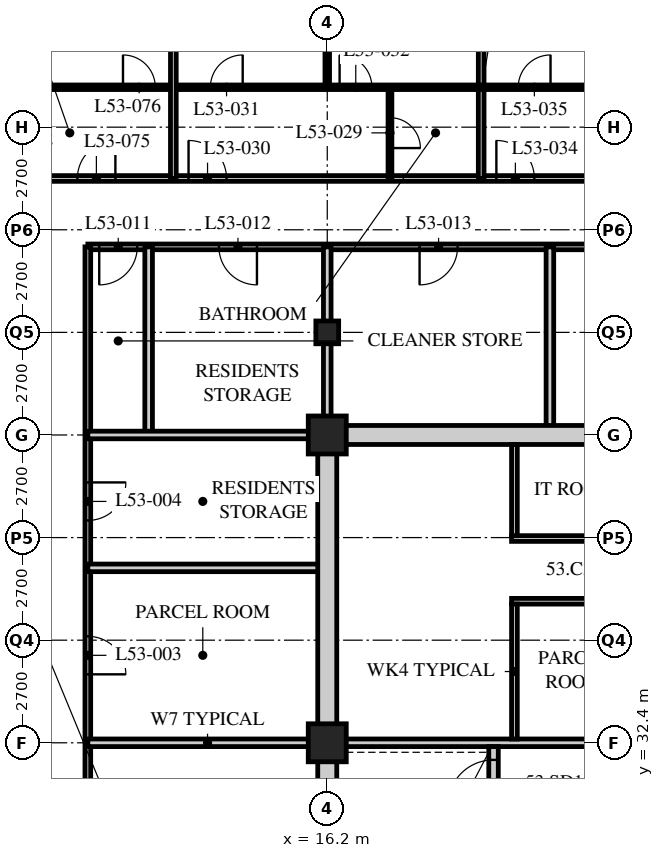
"""IFC4 building model, lengths in metres.
Left out: names, types, materials, properties, quantities, classifications, styles, units other than length and angle.
Written with IfcOpenShell. Run it as: python <this file> out.ifc"""

import sys

from ifc_helpers import new_model, si_unit, direction, frame, frame_2d, origin, origin_2d, place, context, subcontext, project, spatial, rectangle, hollow_rectangle, extrude, element, fill, save


model = new_model("IFC4")
c1 = context("Model", 3, precision=1e-05, world=origin(), true_north=direction((0.0, 1.0)))
c2 = subcontext(c1, "Body", "Model", "MODEL_VIEW")
j1 = project(units=[si_unit("LENGTHUNIT", "METRE"), si_unit("PLANEANGLEUNIT", "RADIAN")], contexts=[c1])
p1 = place(None, origin())
s1 = spatial("IfcSite", under=j1, at=p1, CompositionType="ELEMENT")
p2 = place(p1, origin())
s2 = spatial("IfcBuilding", under=s1, at=p2, CompositionType="ELEMENT")
p3 = place(p2, frame((0.0, 0.0, 206.4)))
s3 = spatial("IfcBuildingStorey", under=s2, at=p3, CompositionType="ELEMENT", Elevation=206.4)
for number, where, z_axis, x_axis in (
    (1, (16.2, 32.4, 0.0), (0.0, 0.0, 1.0), (1.0, 0.0, 0.0)),
    (2, (16.2, 40.5, 0.0), (0.0, 0.0, 1.0), (1.0, 0.0, 0.0)),
):
    element("IfcColumn", number, at=place(p3, frame(where, z_axis=z_axis, x_axis=x_axis)), inside=s3, PredefinedType="COLUMN", context=c2, shape_type="SweptSolid", body=[
        extrude(hollow_rectangle(XDim=1.0, YDim=1.0, WallThickness=0.1, at=origin_2d()), origin(), (0.0, 0.0, 1.0), 3.6),
    ])
p4 = place(p3, frame((16.2, 43.2, 0.0), z_axis=(0.0, 0.0, 1.0), x_axis=(1.0, 0.0, 0.0)))
e3 = element("IfcColumn", 3, at=p4, inside=s3, PredefinedType="COLUMN", context=c2, shape_type="SweptSolid", body=[
    extrude(hollow_rectangle(XDim=0.6, YDim=0.6, WallThickness=0.05, at=origin_2d()), origin(), (0.0, 0.0, 1.0), 3.6),
])
p5 = place(p3, frame((8.1, 47.25, 0.0), z_axis=(0.0, 0.0, 1.0), x_axis=(1.0, 0.0, 0.0)))
e4 = element("IfcWall", 4, at=p5, inside=s3, PredefinedType="PARTITIONING", context=c2, shape_type="SweptSolid", body=[
    extrude(rectangle(XDim=36.45, YDim=0.15, at=frame_2d((18.225, 0.0))), origin(), (0.0, 0.0, 1.0), 3.39),
])
p6 = place(p5, frame((4.45, 0.0, 0.0)))
e5 = element("IfcOpeningElement", 5, at=p6, cuts=e4, PredefinedType="OPENING", context=c2, shape_type="SweptSolid", body=[
    extrude(rectangle(XDim=1.0, YDim=2.1, at=frame_2d((0.5, 1.05))), frame((0.0, 0.085, 0.0), z_axis=(0.0, -1.0, 0.0), x_axis=(1.0, 0.0, 0.0)), (0.0, 0.0, 1.0), 0.17),
])
p7 = place(p5, frame((12.55, 0.0, 0.0)))
e6 = element("IfcOpeningElement", 6, at=p7, cuts=e4, PredefinedType="OPENING", context=c2, shape_type="SweptSolid", body=[
    extrude(rectangle(XDim=1.0, YDim=2.1, at=frame_2d((0.5, 1.05))), frame((0.0, 0.085, 0.0), z_axis=(0.0, -1.0, 0.0), x_axis=(1.0, 0.0, 0.0)), (0.0, 0.0, 1.0), 0.17),
])
p8 = place(p5, frame((30.7, 0.0, 0.0)))
e7 = element("IfcOpeningElement", 7, at=p8, cuts=e4, PredefinedType="OPENING", context=c2, shape_type="SweptSolid", body=[
    extrude(rectangle(XDim=1.0, YDim=2.1, at=frame_2d((0.5, 1.05))), frame((0.0, 0.085, 0.0), z_axis=(0.0, -1.0, 0.0), x_axis=(1.0, 0.0, 0.0)), (0.0, 0.0, 1.0), 0.17),
])
p9 = place(p5, frame((33.925, 0.0, 0.0)))
e8 = element("IfcOpeningElement", 8, at=p9, cuts=e4, PredefinedType="OPENING", context=c2, shape_type="SweptSolid", body=[
    extrude(rectangle(XDim=1.0, YDim=2.1, at=frame_2d((0.5, 1.05))), frame((0.0, 0.085, 0.0), z_axis=(0.0, -1.0, 0.0), x_axis=(1.0, 0.0, 0.0)), (0.0, 0.0, 1.0), 0.17),
])
p10 = place(p5, frame((1.525, 0.0, 0.0)))
e9 = element("IfcOpeningElement", 9, at=p10, cuts=e4, PredefinedType="OPENING", context=c2, shape_type="SweptSolid", body=[
    extrude(rectangle(XDim=1.0, YDim=2.1, at=frame_2d((0.5, 1.05))), frame((0.0, 0.085, 0.0), z_axis=(0.0, -1.0, 0.0), x_axis=(1.0, 0.0, 0.0)), (0.0, 0.0, 1.0), 0.17),
])
p11 = place(p3, frame((27.14, 45.45, 0.0), z_axis=(0.0, 0.0, 1.0), x_axis=(-1.0, 0.0, 0.0)))
e10 = element("IfcWall", 10, at=p11, inside=s3, PredefinedType="PARTITIONING", context=c2, shape_type="SweptSolid", body=[
    extrude(rectangle(XDim=17.24, YDim=0.15, at=frame_2d((8.62, 0.0))), origin(), (0.0, 0.0, 1.0), 3.39),
])
p12 = place(p11, frame((15.94, 0.0, 0.0)))
e11 = element("IfcOpeningElement", 11, at=p12, cuts=e10, PredefinedType="OPENING", context=c2, shape_type="SweptSolid", body=[
    extrude(rectangle(XDim=1.0, YDim=2.1, at=frame_2d((0.5, 1.05))), frame((0.0, 0.085, 0.0), z_axis=(0.0, -1.0, 0.0), x_axis=(1.0, 0.0, 0.0)), (0.0, 0.0, 1.0), 0.17),
])
p13 = place(p11, frame((12.79, 0.0, 0.0)))
e12 = element("IfcOpeningElement", 12, at=p13, cuts=e10, PredefinedType="OPENING", context=c2, shape_type="SweptSolid", body=[
    extrude(rectangle(XDim=1.0, YDim=2.1, at=frame_2d((0.5, 1.05))), frame((0.0, 0.085, 0.0), z_axis=(0.0, -1.0, 0.0), x_axis=(1.0, 0.0, 0.0)), (0.0, 0.0, 1.0), 0.17),
])
p14 = place(p11, frame((7.511, 0.0, 0.0)))
e13 = element("IfcOpeningElement", 13, at=p14, cuts=e10, PredefinedType="OPENING", context=c2, shape_type="SweptSolid", body=[
    extrude(rectangle(XDim=1.0, YDim=2.1, at=frame_2d((0.5, 1.05))), frame((0.0, 0.085, 0.0), z_axis=(0.0, -1.0, 0.0), x_axis=(1.0, 0.0, 0.0)), (0.0, 0.0, 1.0), 0.17),
])
p15 = place(p11, frame((2.036, 0.0, 0.0)))
e14 = element("IfcOpeningElement", 14, at=p15, cuts=e10, PredefinedType="OPENING", context=c2, shape_type="SweptSolid", body=[
    extrude(rectangle(XDim=1.0, YDim=2.1, at=frame_2d((0.5, 1.05))), frame((0.0, 0.085, 0.0), z_axis=(0.0, -1.0, 0.0), x_axis=(1.0, 0.0, 0.0)), (0.0, 0.0, 1.0), 0.17),
])
p16 = place(p3, frame((9.9, 45.45, 0.0), z_axis=(0.0, 0.0, 1.0), x_axis=(0.0, -1.0, 0.0)))
e15 = element("IfcWall", 15, at=p16, inside=s3, PredefinedType="PARTITIONING", context=c2, shape_type="SweptSolid", body=[
    extrude(rectangle(XDim=24.75, YDim=0.15, at=frame_2d((12.375, 0.0))), origin(), (0.0, 0.0, 1.0), 3.39),
])
p17 = place(p16, frame((19.698, 0.0, 0.0)))
e16 = element("IfcOpeningElement", 16, at=p17, cuts=e15, PredefinedType="OPENING", context=c2, shape_type="SweptSolid", body=[
    extrude(rectangle(XDim=1.0, YDim=2.1, at=frame_2d((0.5, 1.05))), frame((0.0, 0.085, 0.0), z_axis=(0.0, -1.0, 0.0), x_axis=(1.0, 0.0, 0.0)), (0.0, 0.0, 1.0), 0.17),
])
p18 = place(p16, frame((15.648, 0.0, 0.0)))
e17 = element("IfcOpeningElement", 17, at=p18, cuts=e15, PredefinedType="OPENING", context=c2, shape_type="SweptSolid", body=[
    extrude(rectangle(XDim=1.0, YDim=2.1, at=frame_2d((0.5, 1.05))), frame((0.0, 0.085, 0.0), z_axis=(0.0, -1.0, 0.0), x_axis=(1.0, 0.0, 0.0)), (0.0, 0.0, 1.0), 0.17),
])
p19 = place(p16, frame((10.248, 0.0, 0.0)))
e18 = element("IfcOpeningElement", 18, at=p19, cuts=e15, PredefinedType="OPENING", context=c2, shape_type="SweptSolid", body=[
    extrude(rectangle(XDim=1.0, YDim=2.1, at=frame_2d((0.5, 1.05))), frame((0.0, 0.085, 0.0), z_axis=(0.0, -1.0, 0.0), x_axis=(1.0, 0.0, 0.0)), (0.0, 0.0, 1.0), 0.17),
])
p20 = place(p16, frame((6.198, 0.0, 0.0)))
e19 = element("IfcOpeningElement", 19, at=p20, cuts=e15, PredefinedType="OPENING", context=c2, shape_type="SweptSolid", body=[
    extrude(rectangle(XDim=1.0, YDim=2.1, at=frame_2d((0.5, 1.05))), frame((0.0, 0.085, 0.0), z_axis=(0.0, -1.0, 0.0), x_axis=(1.0, 0.0, 0.0)), (0.0, 0.0, 1.0), 0.17),
])
for number, where, z_axis, x_axis in (
    (20, (9.9, 32.4, 0.0), (0.0, 0.0, 1.0), (1.0, 0.0, 0.0)),
    (21, (9.9, 37.003, 0.0), (0.0, 0.0, 1.0), (1.0, 0.0, 0.0)),
):
    element("IfcWall", number, at=place(p3, frame(where, z_axis=z_axis, x_axis=x_axis)), inside=s3, PredefinedType="SOLIDWALL", context=c2, shape_type="SweptSolid", body=[
        extrude(rectangle(XDim=6.3, YDim=0.2, at=frame_2d((3.15, 0.0))), origin(), (0.0, 0.0, 1.0), 3.39),
    ])
p21 = place(p3, frame((16.2, 40.5, 0.0), z_axis=(0.0, 0.0, 1.0), x_axis=(0.0, 1.0, 0.0)))
e22 = element("IfcWall", 22, at=p21, inside=s3, PredefinedType="SOLIDWALL", context=c2, shape_type="SweptSolid", body=[
    extrude(rectangle(XDim=4.95, YDim=0.2, at=frame_2d((2.475, 0.0))), origin(), (0.0, 0.0, 1.0), 2.69),
])
for number, where, z_axis, x_axis in (
    (23, (11.5, 45.45, 0.0), (0.0, 0.0, 1.0), (0.0, -1.0, 0.0)),
    (24, (22.059, 45.45, 0.0), (0.0, 0.0, 1.0), (0.0, -1.0, 0.0)),
):
    element("IfcWall", number, at=place(p3, frame(where, z_axis=z_axis, x_axis=x_axis)), inside=s3, PredefinedType="SOLIDWALL", context=c2, shape_type="SweptSolid", body=[
        extrude(rectangle(XDim=4.95, YDim=0.2, at=frame_2d((2.475, 0.0))), origin(), (0.0, 0.0, 1.0), 3.39),
    ])
p22 = place(p3, frame((9.9, 40.5, 0.0), z_axis=(0.0, 0.0, 1.0), x_axis=(1.0, 0.0, 0.0)))
e25 = element("IfcWall", 25, at=p22, inside=s3, PredefinedType="SOLIDWALL", context=c2, shape_type="SweptSolid", body=[
    extrude(rectangle(XDim=6.3, YDim=0.2, at=frame_2d((3.15, 0.0))), origin(), (0.0, 0.0, 1.0), 3.39),
])
p23 = place(p3, frame((17.85, 47.25, 0.0), z_axis=(0.0, 0.0, 1.0), x_axis=(0.0, 1.0, 0.0)))
e26 = element("IfcWall", 26, at=p23, inside=s3, PredefinedType="PARTITIONING", context=c2, shape_type="SweptSolid", body=[
    extrude(rectangle(XDim=2.4, YDim=0.1, at=frame_2d((1.2, 0.0))), origin(), (0.0, 0.0, 1.0), 3.39),
])
p24 = place(p23, frame((0.8, 0.0, 0.0)))
e27 = element("IfcOpeningElement", 27, at=p24, cuts=e26, PredefinedType="OPENING", context=c2, shape_type="SweptSolid", body=[
    extrude(rectangle(XDim=0.8, YDim=2.1, at=frame_2d((0.4, 1.05))), frame((0.0, 0.06, 0.0), z_axis=(0.0, -1.0, 0.0), x_axis=(1.0, 0.0, 0.0)), (0.0, 0.0, 1.0), 0.12),
])
p25 = place(p3, frame((16.2, 49.65, 0.0), z_axis=(0.0, 0.0, 1.0), x_axis=(0.0, 1.0, 0.0)))
e28 = element("IfcWall", 28, at=p25, inside=s3, PredefinedType="PARTITIONING", context=c2, shape_type="SweptSolid", body=[
    extrude(rectangle(XDim=9.45, YDim=0.12, at=frame_2d((4.725, 0.0))), origin(), (0.0, 0.0, 1.0), 2.778),
])
p26 = place(p3, frame((20.25, 47.25, 0.0), z_axis=(0.0, 0.0, 1.0), x_axis=(0.0, 1.0, 0.0)))
e29 = element("IfcWall", 29, at=p26, inside=s3, PredefinedType="PARTITIONING", context=c2, shape_type="SweptSolid", body=[
    extrude(rectangle(XDim=11.85, YDim=0.15, at=frame_2d((5.925, 0.0))), origin(), (0.0, 0.0, 1.0), 3.39),
])
p27 = place(p3, frame((4.1, 49.65, 0.0), z_axis=(0.0, 0.0, 1.0), x_axis=(1.0, 0.0, 0.0)))
e30 = element("IfcWall", 30, at=p27, inside=s3, PredefinedType="PARTITIONING", context=c2, shape_type="SweptSolid", body=[
    extrude(rectangle(XDim=32.35, YDim=0.12, at=frame_2d((16.175, 0.0))), origin(), (0.0, 0.0, 1.0), 3.39),
])
p28 = place(p27, frame((9.025, 0.0, 0.0)))
e31 = element("IfcOpeningElement", 31, at=p28, cuts=e30, PredefinedType="OPENING", context=c2, shape_type="SweptSolid", body=[
    extrude(rectangle(XDim=0.85, YDim=2.1, at=frame_2d((0.425, 1.05))), frame((0.0, 0.07, 0.0), z_axis=(0.0, -1.0, 0.0), x_axis=(1.0, 0.0, 0.0)), (0.0, 0.0, 1.0), 0.14),
])
p29 = place(p27, frame((12.425, 0.0, 0.0)))
e32 = element("IfcOpeningElement", 32, at=p29, cuts=e30, PredefinedType="OPENING", context=c2, shape_type="SweptSolid", body=[
    extrude(rectangle(XDim=0.85, YDim=2.1, at=frame_2d((0.425, 1.05))), frame((0.0, 0.07, 0.0), z_axis=(0.0, -1.0, 0.0), x_axis=(1.0, 0.0, 0.0)), (0.0, 0.0, 1.0), 0.14),
])
p30 = place(p27, frame((17.125, 0.0, 0.0)))
e33 = element("IfcOpeningElement", 33, at=p30, cuts=e30, PredefinedType="OPENING", context=c2, shape_type="SweptSolid", body=[
    extrude(rectangle(XDim=0.85, YDim=2.1, at=frame_2d((0.425, 1.05))), frame((0.0, 0.07, 0.0), z_axis=(0.0, -1.0, 0.0), x_axis=(1.0, 0.0, 0.0)), (0.0, 0.0, 1.0), 0.14),
])
p31 = place(p27, frame((24.575, 0.0, 0.0)))
e34 = element("IfcOpeningElement", 34, at=p31, cuts=e30, PredefinedType="OPENING", context=c2, shape_type="SweptSolid", body=[
    extrude(rectangle(XDim=0.85, YDim=2.1, at=frame_2d((0.425, 1.05))), frame((0.0, 0.07, 0.0), z_axis=(0.0, -1.0, 0.0), x_axis=(1.0, 0.0, 0.0)), (0.0, 0.0, 1.0), 0.14),
])
p32 = place(p27, frame((28.625, 0.0, 0.0)))
e35 = element("IfcOpeningElement", 35, at=p32, cuts=e30, PredefinedType="OPENING", context=c2, shape_type="SweptSolid", body=[
    extrude(rectangle(XDim=0.85, YDim=2.1, at=frame_2d((0.425, 1.05))), frame((0.0, 0.07, 0.0), z_axis=(0.0, -1.0, 0.0), x_axis=(1.0, 0.0, 0.0)), (0.0, 0.0, 1.0), 0.14),
])
p33 = place(p27, frame((6.725, 0.0, 0.0)))
e36 = element("IfcOpeningElement", 36, at=p33, cuts=e30, PredefinedType="OPENING", context=c2, shape_type="SweptSolid", body=[
    extrude(rectangle(XDim=0.85, YDim=2.1, at=frame_2d((0.425, 1.05))), frame((0.0, 0.07, 0.0), z_axis=(0.0, -1.0, 0.0), x_axis=(1.0, 0.0, 0.0)), (0.0, 0.0, 1.0), 0.14),
])
p34 = place(p27, frame((2.875, 0.0, 0.0)))
e37 = element("IfcOpeningElement", 37, at=p34, cuts=e30, PredefinedType="OPENING", context=c2, shape_type="SweptSolid", body=[
    extrude(rectangle(XDim=0.85, YDim=2.1, at=frame_2d((0.425, 1.05))), frame((0.0, 0.07, 0.0), z_axis=(0.0, -1.0, 0.0), x_axis=(1.0, 0.0, 0.0)), (0.0, 0.0, 1.0), 0.14),
])
p35 = place(p3, frame((12.15, 47.25, 0.0), z_axis=(0.0, 0.0, 1.0), x_axis=(0.0, 1.0, 0.0)))
e38 = element("IfcWall", 38, at=p35, inside=s3, PredefinedType="PARTITIONING", context=c2, shape_type="SweptSolid", body=[
    extrude(rectangle(XDim=11.85, YDim=0.15, at=frame_2d((5.925, 0.0))), origin(), (0.0, 0.0, 1.0), 3.39),
])
p36 = place(p3, frame((15.95, 40.5, 0.0), z_axis=(0.0, 0.0, 1.0), x_axis=(1.0, 0.0, 0.0)))
e39 = element("IfcWall", 39, at=p36, inside=s3, PredefinedType="SOLIDWALL", context=c2, shape_type="SweptSolid", body=[
    extrude(rectangle(XDim=24.8, YDim=0.5, at=frame_2d((12.4, 0.0))), origin(), (0.0, 0.0, 1.0), 2.74),
])
p37 = place(p36, frame((11.5, 0.0, 0.0)))
e40 = element("IfcOpeningElement", 40, at=p37, cuts=e39, PredefinedType="OPENING", context=c2, shape_type="SweptSolid", body=[
    extrude(rectangle(XDim=1.8, YDim=2.4, at=frame_2d((0.9, 1.2))), frame((0.0, 0.26, 0.0), z_axis=(0.0, -1.0, 0.0), x_axis=(1.0, 0.0, 0.0)), (0.0, 0.0, 1.0), 0.52),
])
p38 = place(p3, frame((16.2, 24.55, 0.0), z_axis=(0.0, 0.0, 1.0), x_axis=(0.0, 1.0, 0.0)))
e41 = element("IfcWall", 41, at=p38, inside=s3, PredefinedType="SOLIDWALL", context=c2, shape_type="SweptSolid", body=[
    extrude(rectangle(XDim=15.7, YDim=0.5, at=frame_2d((7.85, 0.0))), origin(), (0.0, 0.0, 1.0), 2.778),
])
p39 = place(p3, frame((16.45, 32.4, 0.0), z_axis=(0.0, 0.0, 1.0), x_axis=(1.0, 0.0, 0.0)))
e42 = element("IfcWall", 42, at=p39, inside=s3, PredefinedType="SOLIDWALL", context=c2, shape_type="SweptSolid", body=[
    extrude(rectangle(XDim=7.95, YDim=0.2, at=frame_2d((3.975, 0.0))), origin(), (0.0, 0.0, 1.0), 2.778),
])
p40 = place(p3, frame((20.575, 24.55, 0.0), z_axis=(0.0, 0.0, 1.0), x_axis=(0.0, 1.0, 0.0)))
e43 = element("IfcWall", 43, at=p40, inside=s3, PredefinedType="SOLIDWALL", context=c2, shape_type="SweptSolid", body=[
    extrude(rectangle(XDim=7.75, YDim=0.25, at=frame_2d((3.875, 0.0))), origin(), (0.0, 0.0, 1.0), 3.39),
])
p41 = place(p40, frame((6.2, 0.0, 0.0)))
e44 = element("IfcOpeningElement", 44, at=p41, cuts=e43, PredefinedType="OPENING", context=c2, shape_type="SweptSolid", body=[
    extrude(rectangle(XDim=1.2, YDim=2.1, at=frame_2d((0.6, 1.05))), frame((0.0, 0.135, 0.0), z_axis=(0.0, -1.0, 0.0), x_axis=(1.0, 0.0, 0.0)), (0.0, 0.0, 1.0), 0.27),
])
for number, where, z_axis, x_axis in (
    (45, (21.05, 36.125, 0.0), (0.0, 0.0, 1.0), (1.0, 0.0, 0.0)),
    (46, (21.05, 37.775, 0.0), (0.0, 0.0, 1.0), (1.0, 0.0, 0.0)),
):
    element("IfcWall", number, at=place(p3, frame(where, z_axis=z_axis, x_axis=x_axis)), inside=s3, PredefinedType="PARTITIONING", context=c2, shape_type="SweptSolid", body=[
        extrude(rectangle(XDim=3.15, YDim=0.15, at=frame_2d((1.575, 0.0))), origin(), (0.0, 0.0, 1.0), 3.39),
    ])
p42 = place(p3, frame((21.125, 32.5, 0.0), z_axis=(0.0, 0.0, 1.0), x_axis=(0.0, 1.0, 0.0)))
e47 = element("IfcWall", 47, at=p42, inside=s3, PredefinedType="PARTITIONING", context=c2, shape_type="SweptSolid", body=[
    extrude(rectangle(XDim=3.55, YDim=0.15, at=frame_2d((1.775, 0.0))), origin(), (0.0, 0.0, 1.0), 3.39),
])
p43 = place(p3, frame((21.125, 37.85, 0.0), z_axis=(0.0, 0.0, 1.0), x_axis=(0.0, 1.0, 0.0)))
e48 = element("IfcWall", 48, at=p43, inside=s3, PredefinedType="PARTITIONING", context=c2, shape_type="SweptSolid", body=[
    extrude(rectangle(XDim=2.4, YDim=0.15, at=frame_2d((1.2, 0.0))), origin(), (0.0, 0.0, 1.0), 3.39),
])
p44 = place(p19, origin())
e49 = element("IfcDoor", 49, at=p44, inside=s3, OperationType="SINGLE_SWING_RIGHT", PredefinedType="DOOR", context=c2, shape_type="SweptSolid", body=[
    extrude(rectangle(XDim=1.0, YDim=2.1, at=frame_2d((0.5, 1.05))), frame((0.0, 0.025, 0.0), z_axis=(0.0, -1.0, 0.0), x_axis=(1.0, 0.0, 0.0)), (0.0, 0.0, 1.0), 0.05),
])
fill(e18, e49)
p45 = place(p20, origin())
e50 = element("IfcDoor", 50, at=p45, inside=s3, OperationType="SINGLE_SWING_LEFT", PredefinedType="DOOR", context=c2, shape_type="SweptSolid", body=[
    extrude(rectangle(XDim=1.0, YDim=2.1, at=frame_2d((0.5, 1.05))), frame((0.0, 0.025, 0.0), z_axis=(0.0, -1.0, 0.0), x_axis=(1.0, 0.0, 0.0)), (0.0, 0.0, 1.0), 0.05),
])
fill(e19, e50)
p46 = place(p12, origin())
e51 = element("IfcDoor", 51, at=p46, inside=s3, OperationType="SINGLE_SWING_RIGHT", PredefinedType="DOOR", context=c2, shape_type="SweptSolid", body=[
    extrude(rectangle(XDim=1.0, YDim=2.1, at=frame_2d((0.5, 1.05))), frame((0.0, 0.025, 0.0), z_axis=(0.0, -1.0, 0.0), x_axis=(1.0, 0.0, 0.0)), (0.0, 0.0, 1.0), 0.05),
])
fill(e11, e51)
p47 = place(p13, origin())
e52 = element("IfcDoor", 52, at=p47, inside=s3, OperationType="SINGLE_SWING_LEFT", PredefinedType="DOOR", context=c2, shape_type="SweptSolid", body=[
    extrude(rectangle(XDim=1.0, YDim=2.1, at=frame_2d((0.5, 1.05))), frame((0.0, 0.025, 0.0), z_axis=(0.0, -1.0, 0.0), x_axis=(1.0, 0.0, 0.0)), (0.0, 0.0, 1.0), 0.05),
])
fill(e12, e52)
p48 = place(p14, origin())
e53 = element("IfcDoor", 53, at=p48, inside=s3, OperationType="SINGLE_SWING_RIGHT", PredefinedType="DOOR", context=c2, shape_type="SweptSolid", body=[
    extrude(rectangle(XDim=1.0, YDim=2.1, at=frame_2d((0.5, 1.05))), frame((0.0, 0.025, 0.0), z_axis=(0.0, -1.0, 0.0), x_axis=(1.0, 0.0, 0.0)), (0.0, 0.0, 1.0), 0.05),
])
fill(e13, e53)
p49 = place(p24, origin())
e54 = element("IfcDoor", 54, at=p49, inside=s3, OperationType="SINGLE_SWING_RIGHT", PredefinedType="DOOR", context=c2, shape_type="SweptSolid", body=[
    extrude(rectangle(XDim=0.8, YDim=2.1, at=frame_2d((0.4, 1.05))), frame((0.0, 0.025, 0.0), z_axis=(0.0, -1.0, 0.0), x_axis=(1.0, 0.0, 0.0)), (0.0, 0.0, 1.0), 0.05),
])
fill(e27, e54)
p50 = place(p6, origin())
e55 = element("IfcDoor", 55, at=p50, inside=s3, OperationType="SINGLE_SWING_LEFT", PredefinedType="DOOR", context=c2, shape_type="SweptSolid", body=[
    extrude(rectangle(XDim=1.0, YDim=2.1, at=frame_2d((0.5, 1.05))), frame((0.0, 0.025, 0.0), z_axis=(0.0, -1.0, 0.0), x_axis=(1.0, 0.0, 0.0)), (0.0, 0.0, 1.0), 0.05),
])
fill(e5, e55)
p51 = place(p28, origin())
e56 = element("IfcDoor", 56, at=p51, inside=s3, OperationType="SINGLE_SWING_RIGHT", PredefinedType="DOOR", context=c2, shape_type="SweptSolid", body=[
    extrude(rectangle(XDim=0.85, YDim=2.1, at=frame_2d((0.425, 1.05))), frame((0.0, 0.025, 0.0), z_axis=(0.0, -1.0, 0.0), x_axis=(1.0, 0.0, 0.0)), (0.0, 0.0, 1.0), 0.05),
])
fill(e31, e56)
p52 = place(p29, origin())
e57 = element("IfcDoor", 57, at=p52, inside=s3, OperationType="SINGLE_SWING_LEFT", PredefinedType="DOOR", context=c2, shape_type="SweptSolid", body=[
    extrude(rectangle(XDim=0.85, YDim=2.1, at=frame_2d((0.425, 1.05))), frame((0.0, 0.025, 0.0), z_axis=(0.0, -1.0, 0.0), x_axis=(1.0, 0.0, 0.0)), (0.0, 0.0, 1.0), 0.05),
])
fill(e32, e57)
p53 = place(p7, origin())
e58 = element("IfcDoor", 58, at=p53, inside=s3, OperationType="SINGLE_SWING_LEFT", PredefinedType="DOOR", context=c2, shape_type="SweptSolid", body=[
    extrude(rectangle(XDim=1.0, YDim=2.1, at=frame_2d((0.5, 1.05))), frame((0.0, 0.025, 0.0), z_axis=(0.0, -1.0, 0.0), x_axis=(1.0, 0.0, 0.0)), (0.0, 0.0, 1.0), 0.05),
])
fill(e6, e58)
p54 = place(p30, origin())
e59 = element("IfcDoor", 59, at=p54, inside=s3, OperationType="SINGLE_SWING_RIGHT", PredefinedType="DOOR", context=c2, shape_type="SweptSolid", body=[
    extrude(rectangle(XDim=0.85, YDim=2.1, at=frame_2d((0.425, 1.05))), frame((0.0, 0.025, 0.0), z_axis=(0.0, -1.0, 0.0), x_axis=(1.0, 0.0, 0.0)), (0.0, 0.0, 1.0), 0.05),
])
fill(e33, e59)
p55 = place(p10, origin())
e60 = element("IfcDoor", 60, at=p55, inside=s3, OperationType="SINGLE_SWING_RIGHT", PredefinedType="DOOR", context=c2, shape_type="SweptSolid", body=[
    extrude(rectangle(XDim=1.0, YDim=2.1, at=frame_2d((0.5, 1.05))), frame((0.0, 0.025, 0.0), z_axis=(0.0, -1.0, 0.0), x_axis=(1.0, 0.0, 0.0)), (0.0, 0.0, 1.0), 0.05),
])
fill(e9, e60)
p56 = place(p33, origin())
e61 = element("IfcDoor", 61, at=p56, inside=s3, OperationType="SINGLE_SWING_LEFT", PredefinedType="DOOR", context=c2, shape_type="SweptSolid", body=[
    extrude(rectangle(XDim=0.85, YDim=2.1, at=frame_2d((0.425, 1.05))), frame((0.0, 0.025, 0.0), z_axis=(0.0, -1.0, 0.0), x_axis=(1.0, 0.0, 0.0)), (0.0, 0.0, 1.0), 0.05),
])
fill(e36, e61)
p57 = place(p41, origin())
e62 = element("IfcDoor", 62, at=p57, inside=s3, OperationType="SINGLE_SWING_LEFT", PredefinedType="DOOR", context=c2, shape_type="SweptSolid", body=[
    extrude(rectangle(XDim=1.2, YDim=2.1, at=frame_2d((0.6, 1.05))), frame((0.0, 0.025, 0.0), z_axis=(0.0, -1.0, 0.0), x_axis=(1.0, 0.0, 0.0)), (0.0, 0.0, 1.0), 0.05),
])
fill(e44, e62)
save(model, sys.argv[1])
